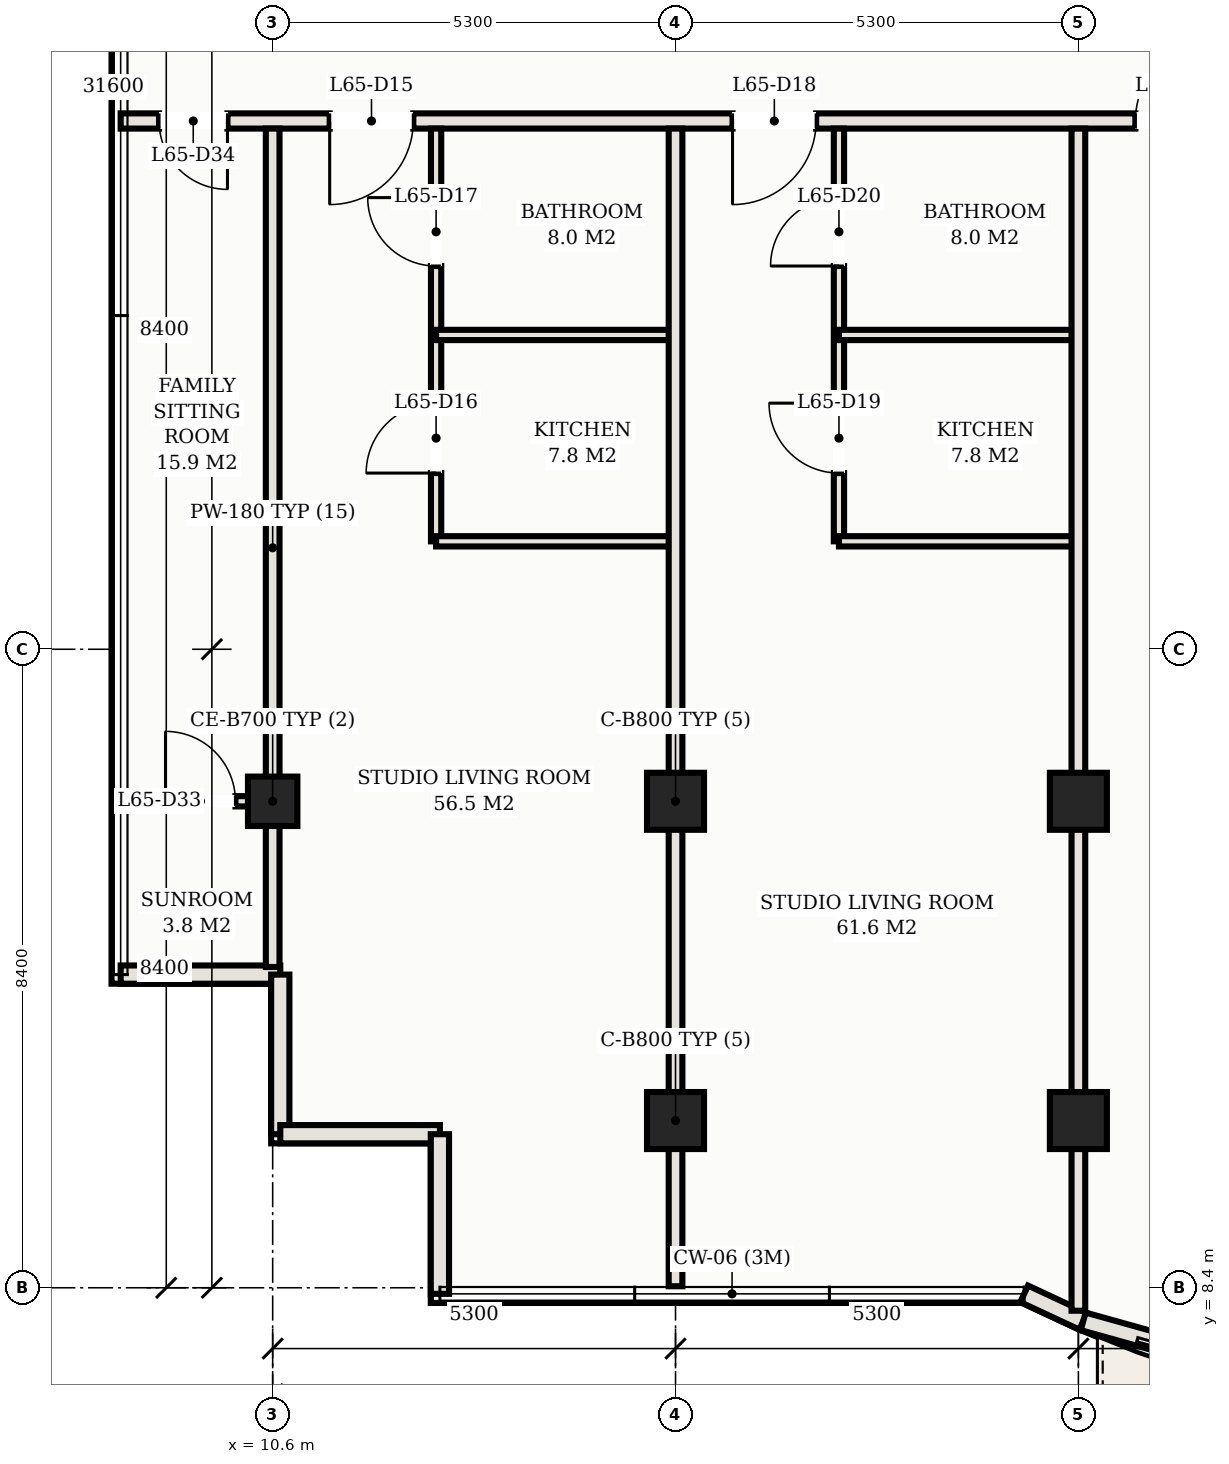
"""IFC4 building model, lengths in metres.
Left out: names, types, materials, properties, quantities, classifications, styles, units other than length and angle.
Written with IfcOpenShell. Run it as: python <this file> out.ifc"""

import sys

from ifc_helpers import new_model, si_unit, direction, frame, frame_2d, origin, origin_2d, place, context, subcontext, project, spatial, rectangle, hollow_rectangle, extrude, element, fill, save


model = new_model("IFC4")
c1 = context("Model", 3, precision=1e-05, world=origin(), true_north=direction((0.0, 1.0)))
c2 = subcontext(c1, "Body", "Model", "MODEL_VIEW")
j1 = project(units=[si_unit("LENGTHUNIT", "METRE"), si_unit("PLANEANGLEUNIT", "RADIAN")], contexts=[c1])
p1 = place(None, origin())
s1 = spatial("IfcSite", under=j1, at=p1, CompositionType="ELEMENT")
p2 = place(p1, origin())
s2 = spatial("IfcBuilding", under=s1, at=p2, CompositionType="ELEMENT")
p3 = place(p2, frame((0.0, 0.0, 236.3)))
s3 = spatial("IfcBuildingStorey", under=s2, at=p3, CompositionType="ELEMENT", Elevation=236.3)
for number, where, z_axis, x_axis in (
    (1, (15.9, 14.8, 0.0), (0.0, 0.0, 1.0), (1.0, 0.0, 0.0)),
    (2, (15.9, 10.6, 0.0), (0.0, 0.0, 1.0), (1.0, 0.0, 0.0)),
    (3, (21.2, 14.8, 0.0), (0.0, 0.0, 1.0), (1.0, 0.0, 0.0)),
    (4, (21.2, 10.6, 0.0), (0.0, 0.0, 1.0), (1.0, 0.0, 0.0)),
):
    element("IfcColumn", number, at=place(p3, frame(where, z_axis=z_axis, x_axis=x_axis)), inside=s3, PredefinedType="COLUMN", context=c2, shape_type="SweptSolid", body=[
        extrude(hollow_rectangle(XDim=0.75, YDim=0.75, WallThickness=0.025, at=origin_2d()), origin(), (0.0, 0.0, 1.0), 3.3),
    ])
p4 = place(p3, frame((10.6, 14.8, 0.0), z_axis=(0.0, 0.0, 1.0), x_axis=(1.0, 0.0, 0.0)))
e5 = element("IfcColumn", 5, at=p4, inside=s3, PredefinedType="COLUMN", context=c2, shape_type="SweptSolid", body=[
    extrude(hollow_rectangle(XDim=0.65, YDim=0.65, WallThickness=0.022, at=origin_2d()), origin(), (0.0, 0.0, 1.0), 3.3),
])
p5 = place(p3, frame((8.6, 12.52, 0.0), z_axis=(0.0, 0.0, 1.0), x_axis=(1.0, 0.0, 0.0)))
e6 = element("IfcWall", 6, at=p5, inside=s3, PredefinedType="SOLIDWALL", context=c2, shape_type="SweptSolid", body=[
    extrude(rectangle(XDim=2.1, YDim=0.24, at=frame_2d((1.05, 0.0))), origin(), (0.0, 0.0, 1.0), 3.11),
])
for number, where, z_axis, x_axis in (
    (7, (10.7, 12.52, 0.0), (0.0, 0.0, 1.0), (0.0, -1.0, 0.0)),
    (8, (10.7, 10.42, 0.0), (0.0, 0.0, 1.0), (1.0, 0.0, 0.0)),
):
    element("IfcWall", number, at=place(p3, frame(where, z_axis=z_axis, x_axis=x_axis)), inside=s3, PredefinedType="SOLIDWALL", context=c2, shape_type="SweptSolid", body=[
        extrude(rectangle(XDim=2.1, YDim=0.24, at=frame_2d((1.05, 0.0))), origin(), (0.0, 0.0, 1.0), 3.11),
    ])
p6 = place(p3, frame((12.8, 10.42, 0.0), z_axis=(0.0, 0.0, 1.0), x_axis=(0.0, -1.0, 0.0)))
e9 = element("IfcWall", 9, at=p6, inside=s3, PredefinedType="SOLIDWALL", context=c2, shape_type="SweptSolid", body=[
    extrude(rectangle(XDim=2.1, YDim=0.24, at=frame_2d((1.05, 0.0))), origin(), (0.0, 0.0, 1.0), 3.11),
])
p7 = place(p3, frame((20.487, 8.32, 0.0), z_axis=(0.0, 0.0, 1.0), x_axis=(0.906190424584, -0.422869855147, 0.0)))
e10 = element("IfcWall", 10, at=p7, inside=s3, PredefinedType="SOLIDWALL", context=c2, shape_type="SweptSolid", body=[
    extrude(rectangle(XDim=0.856, YDim=0.24, at=frame_2d((0.428, 0.0))), origin(), (0.0, 0.0, 1.0), 3.11),
])
p8 = place(p3, frame((21.263, 7.958, 0.0), z_axis=(0.0, 0.0, 1.0), x_axis=(0.963152398068, -0.268956238255, 0.0)))
e11 = element("IfcWall", 11, at=p8, inside=s3, PredefinedType="SOLIDWALL", context=c2, shape_type="SweptSolid", body=[
    extrude(rectangle(XDim=3.885, YDim=0.24, at=frame_2d((1.942, 0.0))), origin(), (0.0, 0.0, 1.0), 3.11),
])
p9 = place(p8, frame((1.074, 0.0, 0.0)))
e12 = element("IfcOpeningElement", 12, at=p9, cuts=e11, PredefinedType="OPENING", context=c2, shape_type="SweptSolid", body=[
    extrude(rectangle(XDim=1.8, YDim=2.2, at=frame_2d((0.9, 1.1))), frame((0.0, 0.13, 0.0), z_axis=(0.0, -1.0, 0.0), x_axis=(1.0, 0.0, 0.0)), (0.0, 0.0, 1.0), 0.26),
])
p10 = place(p3, frame((8.6, 23.75, 0.0), z_axis=(0.0, 0.0, 1.0), x_axis=(1.0, 0.0, 0.0)))
e13 = element("IfcWall", 13, at=p10, inside=s3, PredefinedType="PARTITIONING", context=c2, shape_type="SweptSolid", body=[
    extrude(rectangle(XDim=35.8, YDim=0.2, at=frame_2d((17.9, 0.0))), origin(), (0.0, 0.0, 1.0), 2.45),
])
p11 = place(p10, frame((2.75, 0.0, 0.0)))
e14 = element("IfcOpeningElement", 14, at=p11, cuts=e13, PredefinedType="OPENING", context=c2, shape_type="SweptSolid", body=[
    extrude(rectangle(XDim=1.1, YDim=2.25, at=frame_2d((0.55, 1.125))), frame((0.0, 0.11, 0.0), z_axis=(0.0, -1.0, 0.0), x_axis=(1.0, 0.0, 0.0)), (0.0, 0.0, 1.0), 0.22),
])
p12 = place(p10, frame((8.05, 0.0, 0.0)))
e15 = element("IfcOpeningElement", 15, at=p12, cuts=e13, PredefinedType="OPENING", context=c2, shape_type="SweptSolid", body=[
    extrude(rectangle(XDim=1.1, YDim=2.25, at=frame_2d((0.55, 1.125))), frame((0.0, 0.11, 0.0), z_axis=(0.0, -1.0, 0.0), x_axis=(1.0, 0.0, 0.0)), (0.0, 0.0, 1.0), 0.22),
])
p13 = place(p10, frame((13.35, 0.0, 0.0)))
e16 = element("IfcOpeningElement", 16, at=p13, cuts=e13, PredefinedType="OPENING", context=c2, shape_type="SweptSolid", body=[
    extrude(rectangle(XDim=1.1, YDim=2.25, at=frame_2d((0.55, 1.125))), frame((0.0, 0.11, 0.0), z_axis=(0.0, -1.0, 0.0), x_axis=(1.0, 0.0, 0.0)), (0.0, 0.0, 1.0), 0.22),
])
p14 = place(p10, frame((18.85, 0.0, 0.0)))
e17 = element("IfcOpeningElement", 17, at=p14, cuts=e13, PredefinedType="OPENING", context=c2, shape_type="SweptSolid", body=[
    extrude(rectangle(XDim=1.1, YDim=2.25, at=frame_2d((0.55, 1.125))), frame((0.0, 0.11, 0.0), z_axis=(0.0, -1.0, 0.0), x_axis=(1.0, 0.0, 0.0)), (0.0, 0.0, 1.0), 0.22),
])
p15 = place(p10, frame((23.95, 0.0, 0.0)))
e18 = element("IfcOpeningElement", 18, at=p15, cuts=e13, PredefinedType="OPENING", context=c2, shape_type="SweptSolid", body=[
    extrude(rectangle(XDim=1.1, YDim=2.25, at=frame_2d((0.55, 1.125))), frame((0.0, 0.11, 0.0), z_axis=(0.0, -1.0, 0.0), x_axis=(1.0, 0.0, 0.0)), (0.0, 0.0, 1.0), 0.22),
])
p16 = place(p10, frame((29.25, 0.0, 0.0)))
e19 = element("IfcOpeningElement", 19, at=p16, cuts=e13, PredefinedType="OPENING", context=c2, shape_type="SweptSolid", body=[
    extrude(rectangle(XDim=1.1, YDim=2.25, at=frame_2d((0.55, 1.125))), frame((0.0, 0.11, 0.0), z_axis=(0.0, -1.0, 0.0), x_axis=(1.0, 0.0, 0.0)), (0.0, 0.0, 1.0), 0.22),
])
p17 = place(p10, frame((0.505, 0.0, 0.0)))
e20 = element("IfcOpeningElement", 20, at=p17, cuts=e13, PredefinedType="OPENING", context=c2, shape_type="SweptSolid", body=[
    extrude(rectangle(XDim=0.9, YDim=2.15, at=frame_2d((0.45, 1.075))), frame((0.0, 0.11, 0.0), z_axis=(0.0, -1.0, 0.0), x_axis=(1.0, 0.0, 0.0)), (0.0, 0.0, 1.0), 0.22),
])
p18 = place(p10, frame((34.395, 0.0, 0.0)))
e21 = element("IfcOpeningElement", 21, at=p18, cuts=e13, PredefinedType="OPENING", context=c2, shape_type="SweptSolid", body=[
    extrude(rectangle(XDim=0.9, YDim=2.15, at=frame_2d((0.45, 1.075))), frame((0.0, 0.11, 0.0), z_axis=(0.0, -1.0, 0.0), x_axis=(1.0, 0.0, 0.0)), (0.0, 0.0, 1.0), 0.22),
])
p19 = place(p3, frame((10.6, 12.62, 0.0), z_axis=(0.0, 0.0, 1.0), x_axis=(0.0, 1.0, 0.0)))
e22 = element("IfcWall", 22, at=p19, inside=s3, PredefinedType="PARTITIONING", context=c2, shape_type="SweptSolid", body=[
    extrude(rectangle(XDim=11.03, YDim=0.18, at=frame_2d((5.515, 0.0))), origin(), (0.0, 0.0, 1.0), 2.45),
])
p20 = place(p3, frame((12.75, 18.22, 0.0), z_axis=(0.0, 0.0, 1.0), x_axis=(0.0, 1.0, 0.0)))
e23 = element("IfcWall", 23, at=p20, inside=s3, PredefinedType="PARTITIONING", context=c2, shape_type="SweptSolid", body=[
    extrude(rectangle(XDim=5.43, YDim=0.135, at=frame_2d((2.715, 0.0))), origin(), (0.0, 0.0, 1.0), 2.45),
])
p21 = place(p20, frame((0.898, 0.0, 0.0)))
e24 = element("IfcOpeningElement", 24, at=p21, cuts=e23, PredefinedType="OPENING", context=c2, shape_type="SweptSolid", body=[
    extrude(rectangle(XDim=0.92, YDim=2.15, at=frame_2d((0.46, 1.075))), frame((0.0, 0.078, 0.0), z_axis=(0.0, -1.0, 0.0), x_axis=(1.0, 0.0, 0.0)), (0.0, 0.0, 1.0), 0.155),
])
p22 = place(p20, frame((3.622, 0.0, 0.0)))
e25 = element("IfcOpeningElement", 25, at=p22, cuts=e23, PredefinedType="OPENING", context=c2, shape_type="SweptSolid", body=[
    extrude(rectangle(XDim=0.9, YDim=2.15, at=frame_2d((0.45, 1.075))), frame((0.0, 0.078, 0.0), z_axis=(0.0, -1.0, 0.0), x_axis=(1.0, 0.0, 0.0)), (0.0, 0.0, 1.0), 0.155),
])
for number, where, z_axis, x_axis in (
    (26, (12.75, 18.22, 0.0), (0.0, 0.0, 1.0), (1.0, 0.0, 0.0)),
    (27, (12.75, 20.935, 0.0), (0.0, 0.0, 1.0), (1.0, 0.0, 0.0)),
):
    element("IfcWall", number, at=place(p3, frame(where, z_axis=z_axis, x_axis=x_axis)), inside=s3, PredefinedType="PARTITIONING", context=c2, shape_type="SweptSolid", body=[
        extrude(rectangle(XDim=3.15, YDim=0.135, at=frame_2d((1.575, 0.0))), origin(), (0.0, 0.0, 1.0), 2.45),
    ])
p23 = place(p3, frame((15.9, 8.42, 0.0), z_axis=(0.0, 0.0, 1.0), x_axis=(0.0, 1.0, 0.0)))
e28 = element("IfcWall", 28, at=p23, inside=s3, PredefinedType="PARTITIONING", context=c2, shape_type="SweptSolid", body=[
    extrude(rectangle(XDim=15.23, YDim=0.18, at=frame_2d((7.615, 0.0))), origin(), (0.0, 0.0, 1.0), 2.45),
])
p24 = place(p3, frame((18.05, 18.22, 0.0), z_axis=(0.0, 0.0, 1.0), x_axis=(0.0, 1.0, 0.0)))
e29 = element("IfcWall", 29, at=p24, inside=s3, PredefinedType="PARTITIONING", context=c2, shape_type="SweptSolid", body=[
    extrude(rectangle(XDim=5.43, YDim=0.135, at=frame_2d((2.715, 0.0))), origin(), (0.0, 0.0, 1.0), 2.45),
])
p25 = place(p24, frame((0.898, 0.0, 0.0)))
e30 = element("IfcOpeningElement", 30, at=p25, cuts=e29, PredefinedType="OPENING", context=c2, shape_type="SweptSolid", body=[
    extrude(rectangle(XDim=0.92, YDim=2.15, at=frame_2d((0.46, 1.075))), frame((0.0, 0.078, 0.0), z_axis=(0.0, -1.0, 0.0), x_axis=(1.0, 0.0, 0.0)), (0.0, 0.0, 1.0), 0.155),
])
p26 = place(p24, frame((3.622, 0.0, 0.0)))
e31 = element("IfcOpeningElement", 31, at=p26, cuts=e29, PredefinedType="OPENING", context=c2, shape_type="SweptSolid", body=[
    extrude(rectangle(XDim=0.9, YDim=2.15, at=frame_2d((0.45, 1.075))), frame((0.0, 0.078, 0.0), z_axis=(0.0, -1.0, 0.0), x_axis=(1.0, 0.0, 0.0)), (0.0, 0.0, 1.0), 0.155),
])
for number, where, z_axis, x_axis in (
    (32, (18.05, 18.22, 0.0), (0.0, 0.0, 1.0), (1.0, 0.0, 0.0)),
    (33, (18.05, 20.935, 0.0), (0.0, 0.0, 1.0), (1.0, 0.0, 0.0)),
):
    element("IfcWall", number, at=place(p3, frame(where, z_axis=z_axis, x_axis=x_axis)), inside=s3, PredefinedType="PARTITIONING", context=c2, shape_type="SweptSolid", body=[
        extrude(rectangle(XDim=3.15, YDim=0.135, at=frame_2d((1.575, 0.0))), origin(), (0.0, 0.0, 1.0), 2.45),
    ])
p27 = place(p3, frame((21.2, 8.098, 0.0), z_axis=(0.0, 0.0, 1.0), x_axis=(0.0, 1.0, 0.0)))
e34 = element("IfcWall", 34, at=p27, inside=s3, PredefinedType="PARTITIONING", context=c2, shape_type="SweptSolid", body=[
    extrude(rectangle(XDim=15.552, YDim=0.18, at=frame_2d((7.776, 0.0))), origin(), (0.0, 0.0, 1.0), 2.45),
])
p28 = place(p3, frame((8.7, 14.8, 0.0), z_axis=(0.0, 0.0, 1.0), x_axis=(1.0, 0.0, 0.0)))
e35 = element("IfcWall", 35, at=p28, inside=s3, PredefinedType="PARTITIONING", context=c2, shape_type="SweptSolid", body=[
    extrude(rectangle(XDim=1.9, YDim=0.135, at=frame_2d((0.95, 0.0))), origin(), (0.0, 0.0, 1.0), 2.45),
])
p29 = place(p28, frame((0.49, 0.0, 0.0)))
e36 = element("IfcOpeningElement", 36, at=p29, cuts=e35, PredefinedType="OPENING", context=c2, shape_type="SweptSolid", body=[
    extrude(rectangle(XDim=0.92, YDim=2.15, at=frame_2d((0.46, 1.075))), frame((0.0, 0.078, 0.0), z_axis=(0.0, -1.0, 0.0), x_axis=(1.0, 0.0, 0.0)), (0.0, 0.0, 1.0), 0.155),
])
p30 = place(p11, frame((1.1, 0.0, 0.0), z_axis=(0.0, 0.0, 1.0), x_axis=(-1.0, 0.0, 0.0)))
e37 = element("IfcDoor", 37, at=p30, inside=s3, OperationType="SINGLE_SWING_RIGHT", PredefinedType="DOOR", context=c2, shape_type="SweptSolid", body=[
    extrude(rectangle(XDim=1.1, YDim=2.25, at=frame_2d((0.55, 1.125))), frame((0.0, 0.025, 0.0), z_axis=(0.0, -1.0, 0.0), x_axis=(1.0, 0.0, 0.0)), (0.0, 0.0, 1.0), 0.05),
])
fill(e14, e37)
p31 = place(p21, origin())
e38 = element("IfcDoor", 38, at=p31, inside=s3, OperationType="SINGLE_SWING_LEFT", PredefinedType="DOOR", context=c2, shape_type="SweptSolid", body=[
    extrude(rectangle(XDim=0.92, YDim=2.15, at=frame_2d((0.46, 1.075))), frame((0.0, 0.025, 0.0), z_axis=(0.0, -1.0, 0.0), x_axis=(1.0, 0.0, 0.0)), (0.0, 0.0, 1.0), 0.05),
])
fill(e24, e38)
p32 = place(p22, origin())
e39 = element("IfcDoor", 39, at=p32, inside=s3, OperationType="SINGLE_SWING_RIGHT", PredefinedType="DOOR", context=c2, shape_type="SweptSolid", body=[
    extrude(rectangle(XDim=0.9, YDim=2.15, at=frame_2d((0.45, 1.075))), frame((0.0, 0.025, 0.0), z_axis=(0.0, -1.0, 0.0), x_axis=(1.0, 0.0, 0.0)), (0.0, 0.0, 1.0), 0.05),
])
fill(e25, e39)
p33 = place(p12, frame((1.1, 0.0, 0.0), z_axis=(0.0, 0.0, 1.0), x_axis=(-1.0, 0.0, 0.0)))
e40 = element("IfcDoor", 40, at=p33, inside=s3, OperationType="SINGLE_SWING_RIGHT", PredefinedType="DOOR", context=c2, shape_type="SweptSolid", body=[
    extrude(rectangle(XDim=1.1, YDim=2.25, at=frame_2d((0.55, 1.125))), frame((0.0, 0.025, 0.0), z_axis=(0.0, -1.0, 0.0), x_axis=(1.0, 0.0, 0.0)), (0.0, 0.0, 1.0), 0.05),
])
fill(e15, e40)
p34 = place(p25, origin())
e41 = element("IfcDoor", 41, at=p34, inside=s3, OperationType="SINGLE_SWING_RIGHT", PredefinedType="DOOR", context=c2, shape_type="SweptSolid", body=[
    extrude(rectangle(XDim=0.92, YDim=2.15, at=frame_2d((0.46, 1.075))), frame((0.0, 0.025, 0.0), z_axis=(0.0, -1.0, 0.0), x_axis=(1.0, 0.0, 0.0)), (0.0, 0.0, 1.0), 0.05),
])
fill(e30, e41)
p35 = place(p26, origin())
e42 = element("IfcDoor", 42, at=p35, inside=s3, OperationType="SINGLE_SWING_LEFT", PredefinedType="DOOR", context=c2, shape_type="SweptSolid", body=[
    extrude(rectangle(XDim=0.9, YDim=2.15, at=frame_2d((0.45, 1.075))), frame((0.0, 0.025, 0.0), z_axis=(0.0, -1.0, 0.0), x_axis=(1.0, 0.0, 0.0)), (0.0, 0.0, 1.0), 0.05),
])
fill(e31, e42)
p36 = place(p13, origin())
e43 = element("IfcDoor", 43, at=p36, inside=s3, OperationType="SINGLE_SWING_RIGHT", PredefinedType="DOOR", context=c2, shape_type="SweptSolid", body=[
    extrude(rectangle(XDim=1.1, YDim=2.25, at=frame_2d((0.55, 1.125))), frame((0.0, 0.025, 0.0), z_axis=(0.0, -1.0, 0.0), x_axis=(1.0, 0.0, 0.0)), (0.0, 0.0, 1.0), 0.05),
])
fill(e16, e43)
p37 = place(p29, origin())
e44 = element("IfcDoor", 44, at=p37, inside=s3, OperationType="SINGLE_SWING_LEFT", PredefinedType="DOOR", context=c2, shape_type="SweptSolid", body=[
    extrude(rectangle(XDim=0.92, YDim=2.15, at=frame_2d((0.46, 1.075))), frame((0.0, 0.025, 0.0), z_axis=(0.0, -1.0, 0.0), x_axis=(1.0, 0.0, 0.0)), (0.0, 0.0, 1.0), 0.05),
])
fill(e36, e44)
p38 = place(p17, frame((0.9, 0.0, 0.0), z_axis=(0.0, 0.0, 1.0), x_axis=(-1.0, 0.0, 0.0)))
e45 = element("IfcDoor", 45, at=p38, inside=s3, OperationType="SINGLE_SWING_LEFT", PredefinedType="DOOR", context=c2, shape_type="SweptSolid", body=[
    extrude(rectangle(XDim=0.9, YDim=2.15, at=frame_2d((0.45, 1.075))), frame((0.0, 0.025, 0.0), z_axis=(0.0, -1.0, 0.0), x_axis=(1.0, 0.0, 0.0)), (0.0, 0.0, 1.0), 0.05),
])
fill(e20, e45)
save(model, sys.argv[1])
